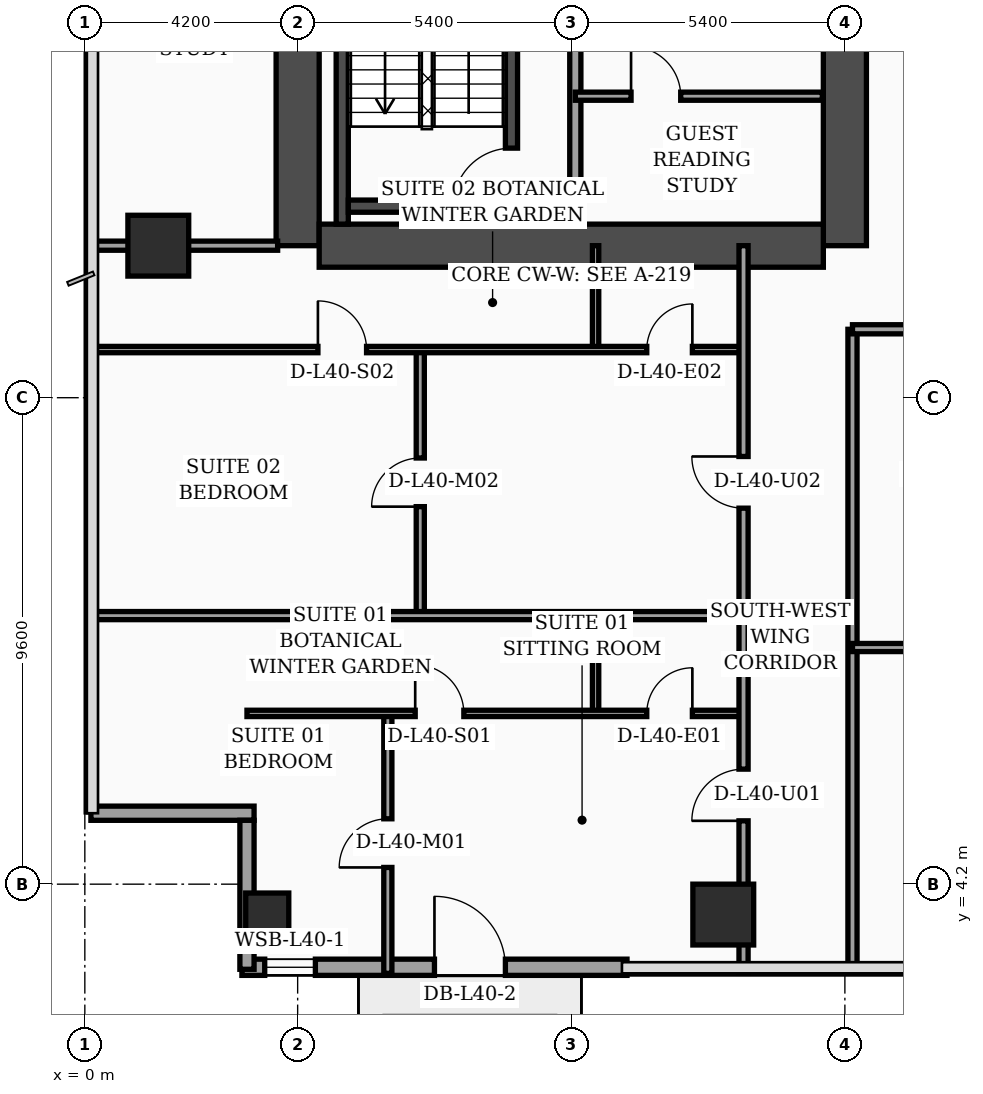
"""IFC4 building model, lengths in metres.
Left out: names, types, materials, properties, quantities, classifications, styles, units other than length and angle.
Written with IfcOpenShell. Run it as: python <this file> out.ifc"""

import sys

from ifc_helpers import new_model, si_unit, direction, frame, frame_2d, origin, origin_2d, place, context, subcontext, project, spatial, rectangle, hollow_rectangle, extrude, element, fill, save


model = new_model("IFC4")
c1 = context("Model", 3, precision=1e-05, world=origin(), true_north=direction((0.0, 1.0)))
c2 = subcontext(c1, "Body", "Model", "MODEL_VIEW")
j1 = project(units=[si_unit("LENGTHUNIT", "METRE"), si_unit("PLANEANGLEUNIT", "RADIAN")], contexts=[c1])
p1 = place(None, origin())
s1 = spatial("IfcSite", under=j1, at=p1, CompositionType="ELEMENT")
p2 = place(p1, origin())
s2 = spatial("IfcBuilding", under=s1, at=p2, CompositionType="ELEMENT")
p3 = place(p2, frame((0.0, 0.0, 163.7)))
s3 = spatial("IfcBuildingStorey", under=s2, at=p3, CompositionType="ELEMENT", Elevation=163.7)
p4 = place(p3, frame((4.2, 16.8, 0.0), z_axis=(0.0, 0.0, 1.0), x_axis=(0.0, 1.0, 0.0)))
e1 = element("IfcWall", 1, at=p4, inside=s3, PredefinedType="SHEAR", context=c2, shape_type="SweptSolid", body=[
    extrude(rectangle(XDim=21.6, YDim=0.85, at=frame_2d((10.8, 0.0))), origin(), (0.0, 0.0, 1.0), 3.56),
])
p5 = place(p3, frame((15.0, 16.8, 0.0), z_axis=(0.0, 0.0, 1.0), x_axis=(0.0, 1.0, 0.0)))
e2 = element("IfcWall", 2, at=p5, inside=s3, PredefinedType="SHEAR", context=c2, shape_type="SweptSolid", body=[
    extrude(rectangle(XDim=21.6, YDim=0.85, at=frame_2d((10.8, 0.0))), origin(), (0.0, 0.0, 1.0), 3.56),
])
p6 = place(p5, frame((8.65, 0.0, 0.0)))
e3 = element("IfcOpeningElement", 3, at=p6, cuts=e2, PredefinedType="OPENING", context=c2, shape_type="SweptSolid", body=[
    extrude(rectangle(XDim=1.1, YDim=2.2, at=frame_2d((0.55, 1.1))), frame((0.0, 0.435, 0.0), z_axis=(0.0, -1.0, 0.0), x_axis=(1.0, 0.0, 0.0)), (0.0, 0.0, 1.0), 0.87),
])
p7 = place(p5, frame((10.85, 0.0, 0.0)))
e4 = element("IfcOpeningElement", 4, at=p7, cuts=e2, PredefinedType="OPENING", context=c2, shape_type="SweptSolid", body=[
    extrude(rectangle(XDim=1.1, YDim=2.2, at=frame_2d((0.55, 1.1))), frame((0.0, 0.435, 0.0), z_axis=(0.0, -1.0, 0.0), x_axis=(1.0, 0.0, 0.0)), (0.0, 0.0, 1.0), 0.87),
])
p8 = place(p5, frame((13.5, 0.0, 0.0)))
e5 = element("IfcOpeningElement", 5, at=p8, cuts=e2, PredefinedType="OPENING", context=c2, shape_type="SweptSolid", body=[
    extrude(rectangle(XDim=1.1, YDim=2.2, at=frame_2d((0.55, 1.1))), frame((0.0, 0.435, 0.0), z_axis=(0.0, -1.0, 0.0), x_axis=(1.0, 0.0, 0.0)), (0.0, 0.0, 1.0), 0.87),
])
p9 = place(p5, frame((16.15, 0.0, 0.0)))
e6 = element("IfcOpeningElement", 6, at=p9, cuts=e2, PredefinedType="OPENING", context=c2, shape_type="SweptSolid", body=[
    extrude(rectangle(XDim=1.1, YDim=2.2, at=frame_2d((0.55, 1.1))), frame((0.0, 0.435, 0.0), z_axis=(0.0, -1.0, 0.0), x_axis=(1.0, 0.0, 0.0)), (0.0, 0.0, 1.0), 0.87),
])
p10 = place(p3, frame((4.625, 16.8, 0.0), z_axis=(0.0, 0.0, 1.0), x_axis=(1.0, 0.0, 0.0)))
e7 = element("IfcWall", 7, at=p10, inside=s3, PredefinedType="SHEAR", context=c2, shape_type="SweptSolid", body=[
    extrude(rectangle(XDim=9.95, YDim=0.85, at=frame_2d((4.975, 0.0))), origin(), (0.0, 0.0, 1.0), 3.56),
])
p11 = place(p3, frame((5.08, 17.225, 0.0), z_axis=(0.0, 0.0, 1.0), x_axis=(0.0, 1.0, 0.0)))
e8 = element("IfcWall", 8, at=p11, inside=s3, PredefinedType="SOLIDWALL", context=c2, shape_type="SweptSolid", body=[
    extrude(rectangle(XDim=9.565, YDim=0.24, at=frame_2d((4.782, 0.0))), origin(), (0.0, 0.0, 1.0), 3.56),
])
p12 = place(p3, frame((8.42, 17.225, 0.0), z_axis=(0.0, 0.0, 1.0), x_axis=(0.0, 1.0, 0.0)))
e9 = element("IfcWall", 9, at=p12, inside=s3, PredefinedType="SOLIDWALL", context=c2, shape_type="SweptSolid", body=[
    extrude(rectangle(XDim=9.565, YDim=0.24, at=frame_2d((4.782, 0.0))), origin(), (0.0, 0.0, 1.0), 3.56),
])
p13 = place(p12, frame((0.35, 0.0, 0.0)))
e10 = element("IfcOpeningElement", 10, at=p13, cuts=e9, PredefinedType="OPENING", context=c2, shape_type="SweptSolid", body=[
    extrude(rectangle(XDim=1.15, YDim=2.2, at=frame_2d((0.575, 1.1))), frame((0.0, 0.13, 0.0), z_axis=(0.0, -1.0, 0.0), x_axis=(1.0, 0.0, 0.0)), (0.0, 0.0, 1.0), 0.26),
])
p14 = place(p3, frame((5.2, 17.58, 0.0), z_axis=(0.0, 0.0, 1.0), x_axis=(1.0, 0.0, 0.0)))
e11 = element("IfcWall", 11, at=p14, inside=s3, PredefinedType="SOLIDWALL", context=c2, shape_type="SweptSolid", body=[
    extrude(rectangle(XDim=3.1, YDim=0.24, at=frame_2d((1.55, 0.0))), origin(), (0.0, 0.0, 1.0), 3.56),
])
p15 = place(p3, frame((3.6, 3.6, 0.0), z_axis=(0.0, 0.0, 1.0), x_axis=(1.0, 0.0, 0.0)))
e12 = element("IfcColumn", 12, at=p15, inside=s3, PredefinedType="COLUMN", context=c2, shape_type="SweptSolid", body=[
    extrude(hollow_rectangle(XDim=0.85, YDim=0.85, WallThickness=0.036, at=origin_2d()), origin(), (0.0, 0.0, 1.0), 3.56),
])
for number, where, z_axis, x_axis in (
    (13, (1.45, 16.8, 0.0), (0.0, 0.0, 1.0), (1.0, 0.0, 0.0)),
    (14, (12.6, 3.6, 0.0), (0.0, 0.0, 1.0), (1.0, 0.0, 0.0)),
):
    element("IfcColumn", number, at=place(p3, frame(where, z_axis=z_axis, x_axis=x_axis)), inside=s3, PredefinedType="COLUMN", context=c2, shape_type="SweptSolid", body=[
        extrude(rectangle(XDim=1.2, YDim=1.2, at=origin_2d()), origin(), (0.0, 0.0, 1.0), 3.56),
    ])
p16 = place(p3, frame((3.1, 2.56, 0.0), z_axis=(0.0, 0.0, 1.0), x_axis=(1.0, 0.0, 0.0)))
e15 = element("IfcWall", 15, at=p16, inside=s3, PredefinedType="SOLIDWALL", context=c2, shape_type="SweptSolid", body=[
    extrude(rectangle(XDim=7.6, YDim=0.32, at=frame_2d((3.8, 0.0))), origin(), (0.0, 0.0, 1.0), 3.56),
])
p17 = place(p16, frame((0.45, 0.0, 0.75)))
e16 = element("IfcOpeningElement", 16, at=p17, cuts=e15, PredefinedType="OPENING", context=c2, shape_type="SweptSolid", body=[
    extrude(rectangle(XDim=1.0, YDim=1.6, at=frame_2d((0.5, 0.8))), frame((0.0, 0.17, 0.0), z_axis=(0.0, -1.0, 0.0), x_axis=(1.0, 0.0, 0.0)), (0.0, 0.0, 1.0), 0.34),
])
p18 = place(p16, frame((3.8, 0.0, 0.0)))
e17 = element("IfcOpeningElement", 17, at=p18, cuts=e15, PredefinedType="OPENING", context=c2, shape_type="SweptSolid", body=[
    extrude(rectangle(XDim=1.4, YDim=2.25, at=frame_2d((0.7, 1.125))), frame((0.0, 0.17, 0.0), z_axis=(0.0, -1.0, 0.0), x_axis=(1.0, 0.0, 0.0)), (0.0, 0.0, 1.0), 0.34),
])
p19 = place(p3, frame((0.12, 5.6, 0.0), z_axis=(0.0, 0.0, 1.0), x_axis=(1.0, 0.0, 0.0)))
e18 = element("IfcWall", 18, at=p19, inside=s3, PredefinedType="SOLIDWALL", context=c2, shape_type="SweptSolid", body=[
    extrude(rectangle(XDim=3.22, YDim=0.28, at=frame_2d((1.61, 0.0))), origin(), (0.0, 0.0, 1.0), 2.94),
])
p20 = place(p3, frame((3.2, 5.46, 0.0), z_axis=(0.0, 0.0, 1.0), x_axis=(0.0, -1.0, 0.0)))
e19 = element("IfcWall", 19, at=p20, inside=s3, PredefinedType="SOLIDWALL", context=c2, shape_type="SweptSolid", body=[
    extrude(rectangle(XDim=2.94, YDim=0.28, at=frame_2d((1.47, 0.0))), origin(), (0.0, 0.0, 1.0), 2.94),
])
p21 = place(p3, frame((9.68, 17.245, 0.0), z_axis=(0.0, 0.0, 1.0), x_axis=(0.0, 1.0, 0.0)))
e20 = element("IfcWall", 20, at=p21, inside=s3, PredefinedType="SOLIDWALL", context=c2, shape_type="SweptSolid", body=[
    extrude(rectangle(XDim=7.755, YDim=0.22, at=frame_2d((3.877, 0.0))), origin(), (0.0, 0.0, 1.0), 3.56),
])
p22 = place(p3, frame((9.68, 19.75, 0.0), z_axis=(0.0, 0.0, 1.0), x_axis=(1.0, 0.0, 0.0)))
e21 = element("IfcWall", 21, at=p22, inside=s3, PredefinedType="PARTITIONING", context=c2, shape_type="SweptSolid", body=[
    extrude(rectangle(XDim=4.875, YDim=0.16, at=frame_2d((2.438, 0.0))), origin(), (0.0, 0.0, 1.0), 3.56),
])
p23 = place(p22, frame((1.1, 0.0, 0.0)))
e22 = element("IfcOpeningElement", 22, at=p23, cuts=e21, PredefinedType="OPENING", context=c2, shape_type="SweptSolid", body=[
    extrude(rectangle(XDim=0.98, YDim=2.15, at=frame_2d((0.49, 1.075))), frame((0.0, 0.09, 0.0), z_axis=(0.0, -1.0, 0.0), x_axis=(1.0, 0.0, 0.0)), (0.0, 0.0, 1.0), 0.18),
])
p24 = place(p3, frame((0.08, 16.8, 0.0), z_axis=(0.0, 0.0, 1.0), x_axis=(1.0, 0.0, 0.0)))
e23 = element("IfcWall", 23, at=p24, inside=s3, PredefinedType="PARTITIONING", context=c2, shape_type="SweptSolid", body=[
    extrude(rectangle(XDim=3.725, YDim=0.18, at=frame_2d((1.862, 0.0))), origin(), (0.0, 0.0, 1.0), 2.94),
])
p25 = place(p3, frame((10.08, 7.57, 0.0), z_axis=(0.0, 0.0, 1.0), x_axis=(0.0, 1.0, 0.0)))
e24 = element("IfcWall", 24, at=p25, inside=s3, PredefinedType="PARTITIONING", context=c2, shape_type="SweptSolid", body=[
    extrude(rectangle(XDim=1.93, YDim=0.125, at=frame_2d((0.965, 0.0))), origin(), (0.0, 0.0, 1.0), 3.09),
])
p26 = place(p3, frame((5.98, 2.44, 0.0), z_axis=(0.0, 0.0, 1.0), x_axis=(0.0, 1.0, 0.0)))
e25 = element("IfcWall", 25, at=p26, inside=s3, PredefinedType="PARTITIONING", context=c2, shape_type="SweptSolid", body=[
    extrude(rectangle(XDim=5.13, YDim=0.16, at=frame_2d((2.565, 0.0))), origin(), (0.0, 0.0, 1.0), 3.04),
])
p27 = place(p26, frame((2.09, 0.0, 0.0)))
e26 = element("IfcOpeningElement", 26, at=p27, cuts=e25, PredefinedType="OPENING", context=c2, shape_type="SweptSolid", body=[
    extrude(rectangle(XDim=0.96, YDim=2.2, at=frame_2d((0.48, 1.1))), frame((0.0, 0.09, 0.0), z_axis=(0.0, -1.0, 0.0), x_axis=(1.0, 0.0, 0.0)), (0.0, 0.0, 1.0), 0.18),
])
p28 = place(p3, frame((3.2, 7.57, 0.0), z_axis=(0.0, 0.0, 1.0), x_axis=(1.0, 0.0, 0.0)))
e27 = element("IfcWall", 27, at=p28, inside=s3, PredefinedType="PARTITIONING", context=c2, shape_type="SweptSolid", body=[
    extrude(rectangle(XDim=9.8, YDim=0.125, at=frame_2d((4.9, 0.0))), origin(), (0.0, 0.0, 1.0), 2.94),
])
p29 = place(p28, frame((3.32, 0.0, 0.0)))
e28 = element("IfcOpeningElement", 28, at=p29, cuts=e27, PredefinedType="OPENING", context=c2, shape_type="SweptSolid", body=[
    extrude(rectangle(XDim=0.96, YDim=2.2, at=frame_2d((0.48, 1.1))), frame((0.0, 0.073, 0.0), z_axis=(0.0, -1.0, 0.0), x_axis=(1.0, 0.0, 0.0)), (0.0, 0.0, 1.0), 0.145),
])
p30 = place(p28, frame((7.89, 0.0, 0.0)))
e29 = element("IfcOpeningElement", 29, at=p30, cuts=e27, PredefinedType="OPENING", context=c2, shape_type="SweptSolid", body=[
    extrude(rectangle(XDim=0.9, YDim=2.15, at=frame_2d((0.45, 1.075))), frame((0.0, 0.073, 0.0), z_axis=(0.0, -1.0, 0.0), x_axis=(1.0, 0.0, 0.0)), (0.0, 0.0, 1.0), 0.145),
])
p31 = place(p3, frame((10.08, 14.75, 0.0), z_axis=(0.0, 0.0, 1.0), x_axis=(0.0, 1.0, 0.0)))
e30 = element("IfcWall", 30, at=p31, inside=s3, PredefinedType="PARTITIONING", context=c2, shape_type="SweptSolid", body=[
    extrude(rectangle(XDim=2.05, YDim=0.125, at=frame_2d((1.025, 0.0))), origin(), (0.0, 0.0, 1.0), 3.56),
])
p32 = place(p3, frame((6.62, 9.5, 0.0), z_axis=(0.0, 0.0, 1.0), x_axis=(0.0, 1.0, 0.0)))
e31 = element("IfcWall", 31, at=p32, inside=s3, PredefinedType="PARTITIONING", context=c2, shape_type="SweptSolid", body=[
    extrude(rectangle(XDim=5.25, YDim=0.16, at=frame_2d((2.625, 0.0))), origin(), (0.0, 0.0, 1.0), 3.14),
])
p33 = place(p32, frame((2.15, 0.0, 0.0)))
e32 = element("IfcOpeningElement", 32, at=p33, cuts=e31, PredefinedType="OPENING", context=c2, shape_type="SweptSolid", body=[
    extrude(rectangle(XDim=0.96, YDim=2.2, at=frame_2d((0.48, 1.1))), frame((0.0, 0.09, 0.0), z_axis=(0.0, -1.0, 0.0), x_axis=(1.0, 0.0, 0.0)), (0.0, 0.0, 1.0), 0.18),
])
p34 = place(p3, frame((0.08, 14.75, 0.0), z_axis=(0.0, 0.0, 1.0), x_axis=(1.0, 0.0, 0.0)))
e33 = element("IfcWall", 33, at=p34, inside=s3, PredefinedType="PARTITIONING", context=c2, shape_type="SweptSolid", body=[
    extrude(rectangle(XDim=12.92, YDim=0.125, at=frame_2d((6.46, 0.0))), origin(), (0.0, 0.0, 1.0), 2.94),
])
p35 = place(p34, frame((4.52, 0.0, 0.0)))
e34 = element("IfcOpeningElement", 34, at=p35, cuts=e33, PredefinedType="OPENING", context=c2, shape_type="SweptSolid", body=[
    extrude(rectangle(XDim=0.96, YDim=2.2, at=frame_2d((0.48, 1.1))), frame((0.0, 0.073, 0.0), z_axis=(0.0, -1.0, 0.0), x_axis=(1.0, 0.0, 0.0)), (0.0, 0.0, 1.0), 0.145),
])
p36 = place(p34, frame((11.01, 0.0, 0.0)))
e35 = element("IfcOpeningElement", 35, at=p36, cuts=e33, PredefinedType="OPENING", context=c2, shape_type="SweptSolid", body=[
    extrude(rectangle(XDim=0.9, YDim=2.15, at=frame_2d((0.45, 1.075))), frame((0.0, 0.073, 0.0), z_axis=(0.0, -1.0, 0.0), x_axis=(1.0, 0.0, 0.0)), (0.0, 0.0, 1.0), 0.145),
])
p37 = place(p3, frame((0.08, 9.5, 0.0), z_axis=(0.0, 0.0, 1.0), x_axis=(1.0, 0.0, 0.0)))
e36 = element("IfcWall", 36, at=p37, inside=s3, PredefinedType="PARTITIONING", context=c2, shape_type="SweptSolid", body=[
    extrude(rectangle(XDim=12.92, YDim=0.16, at=frame_2d((6.46, 0.0))), origin(), (0.0, 0.0, 1.0), 2.94),
])
p38 = place(p3, frame((13.0, 2.44, 0.0), z_axis=(0.0, 0.0, 1.0), x_axis=(0.0, 1.0, 0.0)))
e37 = element("IfcWall", 37, at=p38, inside=s3, PredefinedType="PARTITIONING", context=c2, shape_type="SweptSolid", body=[
    extrude(rectangle(XDim=14.36, YDim=0.18, at=frame_2d((7.18, 0.0))), origin(), (0.0, 0.0, 1.0), 2.94),
])
p39 = place(p38, frame((3.01, 0.0, 0.0)))
e38 = element("IfcOpeningElement", 38, at=p39, cuts=e37, PredefinedType="OPENING", context=c2, shape_type="SweptSolid", body=[
    extrude(rectangle(XDim=1.02, YDim=2.2, at=frame_2d((0.51, 1.1))), frame((0.0, 0.1, 0.0), z_axis=(0.0, -1.0, 0.0), x_axis=(1.0, 0.0, 0.0)), (0.0, 0.0, 1.0), 0.2),
])
p40 = place(p38, frame((9.18, 0.0, 0.0)))
e39 = element("IfcOpeningElement", 39, at=p40, cuts=e37, PredefinedType="OPENING", context=c2, shape_type="SweptSolid", body=[
    extrude(rectangle(XDim=1.02, YDim=2.2, at=frame_2d((0.51, 1.1))), frame((0.0, 0.1, 0.0), z_axis=(0.0, -1.0, 0.0), x_axis=(1.0, 0.0, 0.0)), (0.0, 0.0, 1.0), 0.2),
])
p41 = place(p3, frame((15.15, 2.44, 0.0), z_axis=(0.0, 0.0, 1.0), x_axis=(0.0, 1.0, 0.0)))
e40 = element("IfcWall", 40, at=p41, inside=s3, PredefinedType="PARTITIONING", context=c2, shape_type="SweptSolid", body=[
    extrude(rectangle(XDim=12.71, YDim=0.18, at=frame_2d((6.355, 0.0))), origin(), (0.0, 0.0, 1.0), 3.04),
])
p42 = place(p3, frame((15.15, 8.87, 0.0), z_axis=(0.0, 0.0, 1.0), x_axis=(1.0, 0.0, 0.0)))
e41 = element("IfcWall", 41, at=p42, inside=s3, PredefinedType="PARTITIONING", context=c2, shape_type="SweptSolid", body=[
    extrude(rectangle(XDim=4.45, YDim=0.16, at=frame_2d((2.225, 0.0))), origin(), (0.0, 0.0, 1.0), 3.56),
])
p43 = place(p42, frame((1.75, 0.0, 0.0)))
e42 = element("IfcOpeningElement", 42, at=p43, cuts=e41, PredefinedType="OPENING", context=c2, shape_type="SweptSolid", body=[
    extrude(rectangle(XDim=0.96, YDim=2.2, at=frame_2d((0.48, 1.1))), frame((0.0, 0.09, 0.0), z_axis=(0.0, -1.0, 0.0), x_axis=(1.0, 0.0, 0.0)), (0.0, 0.0, 1.0), 0.18),
])
p44 = place(p3, frame((15.15, 15.15, 0.0), z_axis=(0.0, 0.0, 1.0), x_axis=(1.0, 0.0, 0.0)))
e43 = element("IfcWall", 43, at=p44, inside=s3, PredefinedType="PARTITIONING", context=c2, shape_type="SweptSolid", body=[
    extrude(rectangle(XDim=6.45, YDim=0.18, at=frame_2d((3.225, 0.0))), origin(), (0.0, 0.0, 1.0), 2.49),
])
p45 = place(p44, frame((1.74, 0.0, 0.0)))
e44 = element("IfcOpeningElement", 44, at=p45, cuts=e43, PredefinedType="OPENING", context=c2, shape_type="SweptSolid", body=[
    extrude(rectangle(XDim=1.02, YDim=2.2, at=frame_2d((0.51, 1.1))), frame((0.0, 0.1, 0.0), z_axis=(0.0, -1.0, 0.0), x_axis=(1.0, 0.0, 0.0)), (0.0, 0.0, 1.0), 0.2),
])
p46 = place(p17, origin())
e45 = element("IfcWindow", 45, at=p46, inside=s3, PartitioningType="SINGLE_PANEL", PredefinedType="WINDOW", context=c2, shape_type="SweptSolid", body=[
    extrude(rectangle(XDim=1.0, YDim=1.6, at=frame_2d((0.5, 0.8))), frame((0.0, 0.03, 0.0), z_axis=(0.0, -1.0, 0.0), x_axis=(1.0, 0.0, 0.0)), (0.0, 0.0, 1.0), 0.06),
])
fill(e16, e45)
p47 = place(p18, origin())
e46 = element("IfcDoor", 46, at=p47, inside=s3, OperationType="SINGLE_SWING_LEFT", PredefinedType="DOOR", context=c2, shape_type="SweptSolid", body=[
    extrude(rectangle(XDim=1.4, YDim=2.25, at=frame_2d((0.7, 1.125))), frame((0.0, 0.025, 0.0), z_axis=(0.0, -1.0, 0.0), x_axis=(1.0, 0.0, 0.0)), (0.0, 0.0, 1.0), 0.05),
])
fill(e17, e46)
p48 = place(p23, origin())
e47 = element("IfcDoor", 47, at=p48, inside=s3, OperationType="SINGLE_SWING_LEFT", PredefinedType="DOOR", context=c2, shape_type="SweptSolid", body=[
    extrude(rectangle(XDim=0.98, YDim=2.15, at=frame_2d((0.49, 1.075))), frame((0.0, 0.025, 0.0), z_axis=(0.0, -1.0, 0.0), x_axis=(1.0, 0.0, 0.0)), (0.0, 0.0, 1.0), 0.05),
])
fill(e22, e47)
p49 = place(p27, origin())
e48 = element("IfcDoor", 48, at=p49, inside=s3, OperationType="SINGLE_SWING_LEFT", PredefinedType="DOOR", context=c2, shape_type="SweptSolid", body=[
    extrude(rectangle(XDim=0.96, YDim=2.2, at=frame_2d((0.48, 1.1))), frame((0.0, 0.025, 0.0), z_axis=(0.0, -1.0, 0.0), x_axis=(1.0, 0.0, 0.0)), (0.0, 0.0, 1.0), 0.05),
])
fill(e26, e48)
p50 = place(p29, origin())
e49 = element("IfcDoor", 49, at=p50, inside=s3, OperationType="SINGLE_SWING_LEFT", PredefinedType="DOOR", context=c2, shape_type="SweptSolid", body=[
    extrude(rectangle(XDim=0.96, YDim=2.2, at=frame_2d((0.48, 1.1))), frame((0.0, 0.025, 0.0), z_axis=(0.0, -1.0, 0.0), x_axis=(1.0, 0.0, 0.0)), (0.0, 0.0, 1.0), 0.05),
])
fill(e28, e49)
p51 = place(p30, origin())
e50 = element("IfcDoor", 50, at=p51, inside=s3, OperationType="SINGLE_SWING_RIGHT", PredefinedType="DOOR", context=c2, shape_type="SweptSolid", body=[
    extrude(rectangle(XDim=0.9, YDim=2.15, at=frame_2d((0.45, 1.075))), frame((0.0, 0.025, 0.0), z_axis=(0.0, -1.0, 0.0), x_axis=(1.0, 0.0, 0.0)), (0.0, 0.0, 1.0), 0.05),
])
fill(e29, e50)
p52 = place(p33, origin())
e51 = element("IfcDoor", 51, at=p52, inside=s3, OperationType="SINGLE_SWING_LEFT", PredefinedType="DOOR", context=c2, shape_type="SweptSolid", body=[
    extrude(rectangle(XDim=0.96, YDim=2.2, at=frame_2d((0.48, 1.1))), frame((0.0, 0.025, 0.0), z_axis=(0.0, -1.0, 0.0), x_axis=(1.0, 0.0, 0.0)), (0.0, 0.0, 1.0), 0.05),
])
fill(e32, e51)
p53 = place(p35, origin())
e52 = element("IfcDoor", 52, at=p53, inside=s3, OperationType="SINGLE_SWING_LEFT", PredefinedType="DOOR", context=c2, shape_type="SweptSolid", body=[
    extrude(rectangle(XDim=0.96, YDim=2.2, at=frame_2d((0.48, 1.1))), frame((0.0, 0.025, 0.0), z_axis=(0.0, -1.0, 0.0), x_axis=(1.0, 0.0, 0.0)), (0.0, 0.0, 1.0), 0.05),
])
fill(e34, e52)
p54 = place(p36, origin())
e53 = element("IfcDoor", 53, at=p54, inside=s3, OperationType="SINGLE_SWING_RIGHT", PredefinedType="DOOR", context=c2, shape_type="SweptSolid", body=[
    extrude(rectangle(XDim=0.9, YDim=2.15, at=frame_2d((0.45, 1.075))), frame((0.0, 0.025, 0.0), z_axis=(0.0, -1.0, 0.0), x_axis=(1.0, 0.0, 0.0)), (0.0, 0.0, 1.0), 0.05),
])
fill(e35, e53)
p55 = place(p39, origin())
e54 = element("IfcDoor", 54, at=p55, inside=s3, OperationType="SINGLE_SWING_LEFT", PredefinedType="DOOR", context=c2, shape_type="SweptSolid", body=[
    extrude(rectangle(XDim=1.02, YDim=2.2, at=frame_2d((0.51, 1.1))), frame((0.0, 0.025, 0.0), z_axis=(0.0, -1.0, 0.0), x_axis=(1.0, 0.0, 0.0)), (0.0, 0.0, 1.0), 0.05),
])
fill(e38, e54)
p56 = place(p40, origin())
e55 = element("IfcDoor", 55, at=p56, inside=s3, OperationType="SINGLE_SWING_RIGHT", PredefinedType="DOOR", context=c2, shape_type="SweptSolid", body=[
    extrude(rectangle(XDim=1.02, YDim=2.2, at=frame_2d((0.51, 1.1))), frame((0.0, 0.025, 0.0), z_axis=(0.0, -1.0, 0.0), x_axis=(1.0, 0.0, 0.0)), (0.0, 0.0, 1.0), 0.05),
])
fill(e39, e55)
p57 = place(p13, origin())
e56 = element("IfcDoor", 56, at=p57, inside=s3, OperationType="SINGLE_SWING_LEFT", PredefinedType="DOOR", context=c2, shape_type="SweptSolid", body=[
    extrude(rectangle(XDim=1.15, YDim=2.2, at=frame_2d((0.575, 1.1))), frame((0.0, 0.025, 0.0), z_axis=(0.0, -1.0, 0.0), x_axis=(1.0, 0.0, 0.0)), (0.0, 0.0, 1.0), 0.05),
])
fill(e10, e56)
save(model, sys.argv[1])
